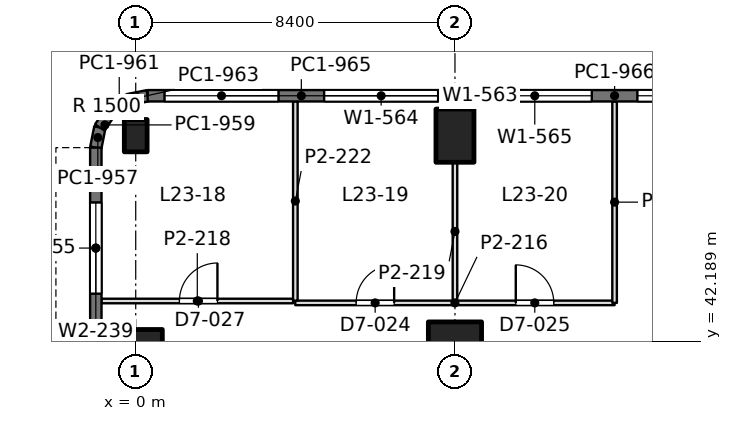
"""IFC4 building model, lengths in metres.
Left out: names, types, materials, properties, quantities, classifications, styles, units other than length and angle.
Written with IfcOpenShell. Run it as: python <this file> out.ifc"""

import sys

from ifc_helpers import new_model, si_unit, direction, frame, frame_2d, origin, origin_2d, place, context, subcontext, project, spatial, rectangle, extrude, element, fill, save


model = new_model("IFC4")
c1 = context("Model", 3, precision=1e-05, world=origin(), true_north=direction((0.0, 1.0)))
c2 = subcontext(c1, "Body", "Model", "MODEL_VIEW")
j1 = project(units=[si_unit("LENGTHUNIT", "METRE"), si_unit("PLANEANGLEUNIT", "RADIAN")], contexts=[c1])
p1 = place(None, origin())
s1 = spatial("IfcSite", under=j1, at=p1, CompositionType="ELEMENT")
p2 = place(p1, origin())
s2 = spatial("IfcBuilding", under=s1, at=p2, CompositionType="ELEMENT")
p3 = place(p2, frame((0.0, 0.0, 105.0)))
s3 = spatial("IfcBuildingStorey", under=s2, at=p3, CompositionType="ELEMENT", Elevation=105.0)
p4 = place(p3, frame((0.0, 42.0, 0.0), z_axis=(0.0, 0.0, 1.0), x_axis=(0.0, 1.0, 0.0)))
e1 = element("IfcColumn", 1, at=p4, inside=s3, PredefinedType="COLUMN", context=c2, shape_type="SweptSolid", body=[
    extrude(rectangle(XDim=1.0, YDim=1.4, at=origin_2d()), origin(), (0.0, 0.0, 1.0), 4.2),
])
p5 = place(p3, frame((0.0, 47.6, 0.0), z_axis=(0.0, 0.0, 1.0), x_axis=(1.0, 0.0, 0.0)))
e2 = element("IfcColumn", 2, at=p5, inside=s3, PredefinedType="COLUMN", context=c2, shape_type="SweptSolid", body=[
    extrude(rectangle(XDim=0.6, YDim=0.85, at=origin_2d()), origin(), (0.0, 0.0, 1.0), 4.2),
])
p6 = place(p3, frame((8.4, 42.0, 0.0), z_axis=(0.0, 0.0, 1.0), x_axis=(1.0, 0.0, 0.0)))
e3 = element("IfcColumn", 3, at=p6, inside=s3, PredefinedType="COLUMN", context=c2, shape_type="SweptSolid", body=[
    extrude(rectangle(XDim=1.4, YDim=1.4, at=origin_2d()), origin(), (0.0, 0.0, 1.0), 4.2),
])
p7 = place(p3, frame((8.4, 47.6, 0.0), z_axis=(0.0, 0.0, 1.0), x_axis=(1.0, 0.0, 0.0)))
e4 = element("IfcColumn", 4, at=p7, inside=s3, PredefinedType="COLUMN", context=c2, shape_type="SweptSolid", body=[
    extrude(rectangle(XDim=1.0, YDim=1.4, at=origin_2d()), origin(), (0.0, 0.0, 1.0), 4.2),
])
p8 = place(p3, frame((-1.05, 42.0, 0.0), z_axis=(0.0, 0.0, 1.0), x_axis=(0.0, 1.0, 0.0)))
e5 = element("IfcWall", 5, at=p8, inside=s3, PredefinedType="SOLIDWALL", context=c2, shape_type="SweptSolid", body=[
    extrude(rectangle(XDim=5.285, YDim=0.3, at=frame_2d((2.643, 0.0))), origin(), (0.0, 0.0, 1.0), 4.05),
])
p9 = place(p8, frame((1.443, 0.0, 0.9)))
e6 = element("IfcOpeningElement", 6, at=p9, cuts=e5, PredefinedType="OPENING", context=c2, shape_type="SweptSolid", body=[
    extrude(rectangle(XDim=2.4, YDim=1.9, at=frame_2d((1.2, 0.95))), frame((0.0, 0.16, 0.0), z_axis=(0.0, -1.0, 0.0), x_axis=(1.0, 0.0, 0.0)), (0.0, 0.0, 1.0), 0.32),
])
p10 = place(p3, frame((-1.05, 47.285, 0.0), z_axis=(0.0, 0.0, 1.0), x_axis=(0.195073962632, 0.980788534345, 0.0)))
e7 = element("IfcWall", 7, at=p10, inside=s3, PredefinedType="SOLIDWALL", context=c2, shape_type="SweptSolid", body=[
    extrude(rectangle(XDim=0.541, YDim=0.3, at=frame_2d((0.271, 0.0))), origin(), (0.0, 0.0, 1.0), 4.05),
])
p11 = place(p3, frame((-0.945, 47.815, 0.0), z_axis=(0.0, 0.0, 1.0), x_axis=(0.55534295404, 0.831621430339, 0.0)))
e8 = element("IfcWall", 8, at=p11, inside=s3, PredefinedType="SOLIDWALL", context=c2, shape_type="SweptSolid", body=[
    extrude(rectangle(XDim=0.526, YDim=0.3, at=frame_2d((0.263, 0.0))), origin(), (0.0, 0.0, 1.0), 4.05),
])
p12 = place(p3, frame((-0.653, 48.253, 0.0), z_axis=(0.0, 0.0, 1.0), x_axis=(0.831692711774, 0.555236195849, 0.0)))
e9 = element("IfcWall", 9, at=p12, inside=s3, PredefinedType="SOLIDWALL", context=c2, shape_type="SweptSolid", body=[
    extrude(rectangle(XDim=0.525, YDim=0.3, at=frame_2d((0.263, 0.0))), origin(), (0.0, 0.0, 1.0), 4.05),
])
p13 = place(p3, frame((-0.216, 48.544, 0.0), z_axis=(0.0, 0.0, 1.0), x_axis=(0.980788534345, 0.195073962632, 0.0)))
e10 = element("IfcWall", 10, at=p13, inside=s3, PredefinedType="SOLIDWALL", context=c2, shape_type="SweptSolid", body=[
    extrude(rectangle(XDim=0.541, YDim=0.3, at=frame_2d((0.271, 0.0))), origin(), (0.0, 0.0, 1.0), 4.05),
])
p14 = place(p3, frame((0.315, 48.65, 0.0), z_axis=(0.0, 0.0, 1.0), x_axis=(1.0, 0.0, 0.0)))
e11 = element("IfcWall", 11, at=p14, inside=s3, PredefinedType="SOLIDWALL", context=c2, shape_type="SweptSolid", body=[
    extrude(rectangle(XDim=8.085, YDim=0.3, at=frame_2d((4.042, 0.0))), origin(), (0.0, 0.0, 1.0), 4.05),
])
p15 = place(p14, frame((0.443, 0.0, 0.9)))
e12 = element("IfcOpeningElement", 12, at=p15, cuts=e11, PredefinedType="OPENING", context=c2, shape_type="SweptSolid", body=[
    extrude(rectangle(XDim=3.0, YDim=1.9, at=frame_2d((1.5, 0.95))), frame((0.0, 0.16, 0.0), z_axis=(0.0, -1.0, 0.0), x_axis=(1.0, 0.0, 0.0)), (0.0, 0.0, 1.0), 0.32),
])
p16 = place(p14, frame((4.643, 0.0, 0.9)))
e13 = element("IfcOpeningElement", 13, at=p16, cuts=e11, PredefinedType="OPENING", context=c2, shape_type="SweptSolid", body=[
    extrude(rectangle(XDim=3.0, YDim=1.9, at=frame_2d((1.5, 0.95))), frame((0.0, 0.16, 0.0), z_axis=(0.0, -1.0, 0.0), x_axis=(1.0, 0.0, 0.0)), (0.0, 0.0, 1.0), 0.32),
])
p17 = place(p3, frame((8.4, 48.65, 0.0), z_axis=(0.0, 0.0, 1.0), x_axis=(1.0, 0.0, 0.0)))
e14 = element("IfcWall", 14, at=p17, inside=s3, PredefinedType="SOLIDWALL", context=c2, shape_type="SweptSolid", body=[
    extrude(rectangle(XDim=8.4, YDim=0.3, at=frame_2d((4.2, 0.0))), origin(), (0.0, 0.0, 1.0), 4.05),
])
p18 = place(p17, frame((0.6, 0.0, 0.9)))
e15 = element("IfcOpeningElement", 15, at=p18, cuts=e14, PredefinedType="OPENING", context=c2, shape_type="SweptSolid", body=[
    extrude(rectangle(XDim=3.0, YDim=1.9, at=frame_2d((1.5, 0.95))), frame((0.0, 0.16, 0.0), z_axis=(0.0, -1.0, 0.0), x_axis=(1.0, 0.0, 0.0)), (0.0, 0.0, 1.0), 0.32),
])
p19 = place(p17, frame((4.8, 0.0, 0.9)))
e16 = element("IfcOpeningElement", 16, at=p19, cuts=e14, PredefinedType="OPENING", context=c2, shape_type="SweptSolid", body=[
    extrude(rectangle(XDim=3.0, YDim=1.9, at=frame_2d((1.5, 0.95))), frame((0.0, 0.16, 0.0), z_axis=(0.0, -1.0, 0.0), x_axis=(1.0, 0.0, 0.0)), (0.0, 0.0, 1.0), 0.32),
])
p20 = place(p3, frame((-0.902, 43.25, 0.0), z_axis=(0.0, 0.0, 1.0), x_axis=(1.0, 0.0, 0.0)))
e17 = element("IfcWall", 17, at=p20, inside=s3, PredefinedType="PARTITIONING", context=c2, shape_type="SweptSolid", body=[
    extrude(rectangle(XDim=5.044, YDim=0.12, at=frame_2d((2.522, 0.0))), origin(), (0.0, 0.0, 1.0), 3.56),
])
p21 = place(p20, frame((2.052, 0.0, 0.0)))
e18 = element("IfcOpeningElement", 18, at=p21, cuts=e17, PredefinedType="OPENING", context=c2, shape_type="SweptSolid", body=[
    extrude(rectangle(XDim=1.0, YDim=2.4, at=frame_2d((0.5, 1.2))), frame((0.0, 0.07, 0.0), z_axis=(0.0, -1.0, 0.0), x_axis=(1.0, 0.0, 0.0)), (0.0, 0.0, 1.0), 0.14),
])
p22 = place(p3, frame((4.198, 43.2, 0.0), z_axis=(0.0, 0.0, 1.0), x_axis=(1.0, 0.0, 0.0)))
e19 = element("IfcWall", 19, at=p22, inside=s3, PredefinedType="PARTITIONING", context=c2, shape_type="SweptSolid", body=[
    extrude(rectangle(XDim=8.402, YDim=0.12, at=frame_2d((4.201, 0.0))), origin(), (0.0, 0.0, 1.0), 3.55),
])
p23 = place(p22, frame((1.602, 0.0, 0.0)))
e20 = element("IfcOpeningElement", 20, at=p23, cuts=e19, PredefinedType="OPENING", context=c2, shape_type="SweptSolid", body=[
    extrude(rectangle(XDim=1.0, YDim=2.4, at=frame_2d((0.5, 1.2))), frame((0.0, 0.07, 0.0), z_axis=(0.0, -1.0, 0.0), x_axis=(1.0, 0.0, 0.0)), (0.0, 0.0, 1.0), 0.14),
])
p24 = place(p22, frame((5.802, 0.0, 0.0)))
e21 = element("IfcOpeningElement", 21, at=p24, cuts=e19, PredefinedType="OPENING", context=c2, shape_type="SweptSolid", body=[
    extrude(rectangle(XDim=1.0, YDim=2.4, at=frame_2d((0.5, 1.2))), frame((0.0, 0.07, 0.0), z_axis=(0.0, -1.0, 0.0), x_axis=(1.0, 0.0, 0.0)), (0.0, 0.0, 1.0), 0.14),
])
p25 = place(p3, frame((4.2, 43.258, 0.0), z_axis=(0.0, 0.0, 1.0), x_axis=(0.0, 1.0, 0.0)))
e22 = element("IfcWall", 22, at=p25, inside=s3, PredefinedType="PARTITIONING", context=c2, shape_type="SweptSolid", body=[
    extrude(rectangle(XDim=5.244, YDim=0.12, at=frame_2d((2.622, 0.0))), origin(), (0.0, 0.0, 1.0), 3.56),
])
p26 = place(p3, frame((8.4, 43.258, 0.0), z_axis=(0.0, 0.0, 1.0), x_axis=(0.0, 1.0, 0.0)))
e23 = element("IfcWall", 23, at=p26, inside=s3, PredefinedType="PARTITIONING", context=c2, shape_type="SweptSolid", body=[
    extrude(rectangle(XDim=3.643, YDim=0.12, at=frame_2d((1.821, 0.0))), origin(), (0.0, 0.0, 1.0), 3.55),
])
p27 = place(p3, frame((12.6, 43.2, 0.0), z_axis=(0.0, 0.0, 1.0), x_axis=(0.0, 1.0, 0.0)))
e24 = element("IfcWall", 24, at=p27, inside=s3, PredefinedType="PARTITIONING", context=c2, shape_type="SweptSolid", body=[
    extrude(rectangle(XDim=5.302, YDim=0.12, at=frame_2d((2.651, 0.0))), origin(), (0.0, 0.0, 1.0), 3.56),
])
p28 = place(p9, origin())
e25 = element("IfcWindow", 25, at=p28, inside=s3, PartitioningType="SINGLE_PANEL", PredefinedType="WINDOW", context=c2, shape_type="SweptSolid", body=[
    extrude(rectangle(XDim=2.4, YDim=1.9, at=frame_2d((1.2, 0.95))), frame((0.0, 0.03, 0.0), z_axis=(0.0, -1.0, 0.0), x_axis=(1.0, 0.0, 0.0)), (0.0, 0.0, 1.0), 0.06),
])
fill(e6, e25)
p29 = place(p15, origin())
e26 = element("IfcWindow", 26, at=p29, inside=s3, PartitioningType="SINGLE_PANEL", PredefinedType="WINDOW", context=c2, shape_type="SweptSolid", body=[
    extrude(rectangle(XDim=3.0, YDim=1.9, at=frame_2d((1.5, 0.95))), frame((0.0, 0.03, 0.0), z_axis=(0.0, -1.0, 0.0), x_axis=(1.0, 0.0, 0.0)), (0.0, 0.0, 1.0), 0.06),
])
fill(e12, e26)
p30 = place(p16, origin())
e27 = element("IfcWindow", 27, at=p30, inside=s3, PartitioningType="SINGLE_PANEL", PredefinedType="WINDOW", context=c2, shape_type="SweptSolid", body=[
    extrude(rectangle(XDim=3.0, YDim=1.9, at=frame_2d((1.5, 0.95))), frame((0.0, 0.03, 0.0), z_axis=(0.0, -1.0, 0.0), x_axis=(1.0, 0.0, 0.0)), (0.0, 0.0, 1.0), 0.06),
])
fill(e13, e27)
p31 = place(p18, origin())
e28 = element("IfcWindow", 28, at=p31, inside=s3, PartitioningType="SINGLE_PANEL", PredefinedType="WINDOW", context=c2, shape_type="SweptSolid", body=[
    extrude(rectangle(XDim=3.0, YDim=1.9, at=frame_2d((1.5, 0.95))), frame((0.0, 0.03, 0.0), z_axis=(0.0, -1.0, 0.0), x_axis=(1.0, 0.0, 0.0)), (0.0, 0.0, 1.0), 0.06),
])
fill(e15, e28)
p32 = place(p19, origin())
e29 = element("IfcWindow", 29, at=p32, inside=s3, PartitioningType="SINGLE_PANEL", PredefinedType="WINDOW", context=c2, shape_type="SweptSolid", body=[
    extrude(rectangle(XDim=3.0, YDim=1.9, at=frame_2d((1.5, 0.95))), frame((0.0, 0.03, 0.0), z_axis=(0.0, -1.0, 0.0), x_axis=(1.0, 0.0, 0.0)), (0.0, 0.0, 1.0), 0.06),
])
fill(e16, e29)
p33 = place(p21, origin())
e30 = element("IfcDoor", 30, at=p33, inside=s3, OperationType="SINGLE_SWING_RIGHT", PredefinedType="DOOR", context=c2, shape_type="SweptSolid", body=[
    extrude(rectangle(XDim=1.0, YDim=2.4, at=frame_2d((0.5, 1.2))), frame((0.0, 0.025, 0.0), z_axis=(0.0, -1.0, 0.0), x_axis=(1.0, 0.0, 0.0)), (0.0, 0.0, 1.0), 0.05),
])
fill(e18, e30)
p34 = place(p23, origin())
e31 = element("IfcDoor", 31, at=p34, inside=s3, OperationType="SINGLE_SWING_RIGHT", PredefinedType="DOOR", context=c2, shape_type="SweptSolid", body=[
    extrude(rectangle(XDim=1.0, YDim=2.4, at=frame_2d((0.5, 1.2))), frame((0.0, 0.025, 0.0), z_axis=(0.0, -1.0, 0.0), x_axis=(1.0, 0.0, 0.0)), (0.0, 0.0, 1.0), 0.05),
])
fill(e20, e31)
p35 = place(p24, origin())
e32 = element("IfcDoor", 32, at=p35, inside=s3, OperationType="SINGLE_SWING_LEFT", PredefinedType="DOOR", context=c2, shape_type="SweptSolid", body=[
    extrude(rectangle(XDim=1.0, YDim=2.4, at=frame_2d((0.5, 1.2))), frame((0.0, 0.025, 0.0), z_axis=(0.0, -1.0, 0.0), x_axis=(1.0, 0.0, 0.0)), (0.0, 0.0, 1.0), 0.05),
])
fill(e21, e32)
save(model, sys.argv[1])
